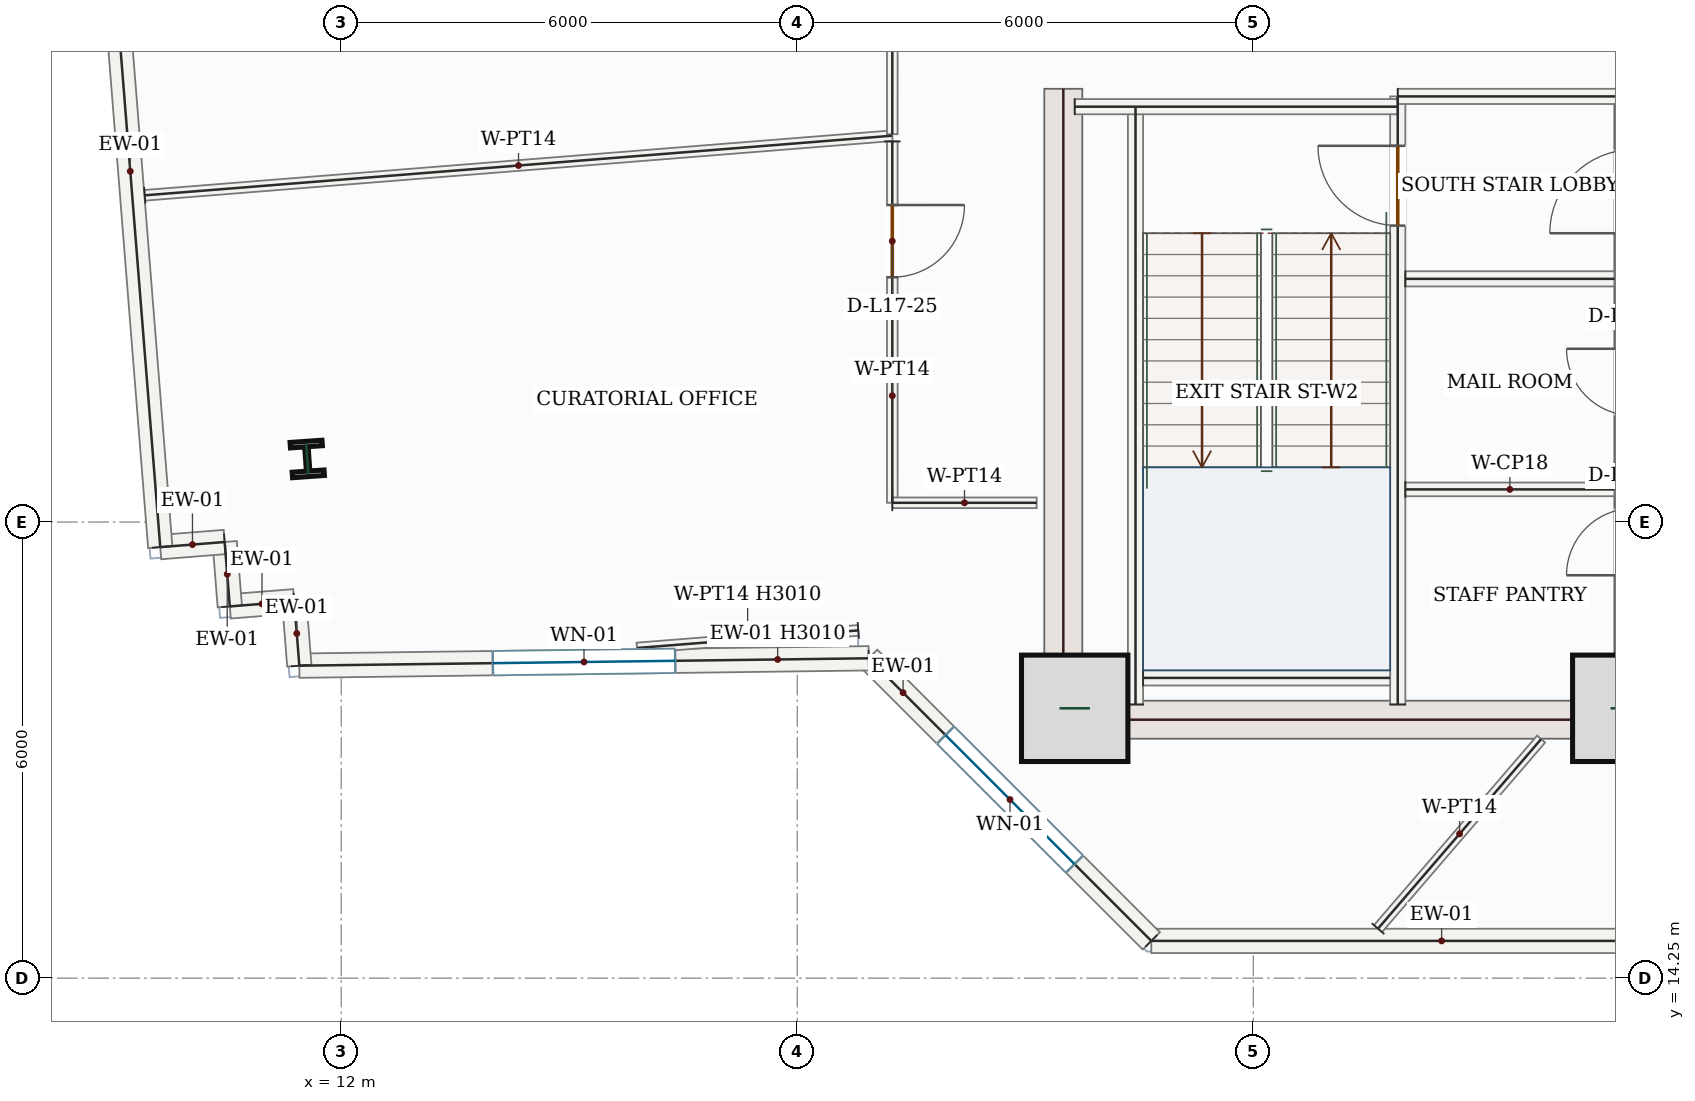
"""IFC4 building model, lengths in metres.
Left out: names, types, materials, properties, quantities, classifications, styles, units other than length and angle.
Written with IfcOpenShell. Run it as: python <this file> out.ifc"""

import sys

from ifc_helpers import new_model, si_unit, direction, frame, frame_2d, origin, origin_2d, place, context, subcontext, project, spatial, rectangle, i_section, extrude, source, transform, mapped, element, fill, save


model = new_model("IFC4")
c1 = context("Model", 3, precision=1e-05, world=origin(), true_north=direction((0.0, 1.0)))
c2 = subcontext(c1, "Body", "Model", "MODEL_VIEW")
j1 = project(units=[si_unit("LENGTHUNIT", "METRE"), si_unit("PLANEANGLEUNIT", "RADIAN")], contexts=[c1])
p1 = place(None, origin())
s1 = spatial("IfcSite", under=j1, at=p1, CompositionType="ELEMENT")
p2 = place(p1, origin())
s2 = spatial("IfcBuilding", under=s1, at=p2, CompositionType="ELEMENT")
p3 = place(p2, frame((0.0, 0.0, 79.5)))
s3 = spatial("IfcBuildingStorey", under=s2, at=p3, CompositionType="ELEMENT", Elevation=79.5)
m1 = source(origin(), c2, "Body", "SweptSolid", [
    extrude(rectangle(XDim=8.55, YDim=0.5, at=frame_2d((4.275, 0.0))), origin(), (0.0, 0.0, 1.0), 3.95),
])
p4 = place(p3, frame((21.5, 17.4, 0.0), z_axis=(0.0, 0.0, 1.0), x_axis=(0.0, 1.0, 0.0)))
e1 = element("IfcWall", 1, at=p4, inside=s3, PredefinedType="SHEAR", context=c2, shape_type="MappedRepresentation", body=[
    mapped(m1, transform((0.0, 0.0, 0.0), x_axis=(1.0, 0.0, 0.0), y_axis=(0.0, 1.0, 0.0), z_axis=(0.0, 0.0, 1.0), scale=1.0)),
])
p5 = place(p3, frame((29.0, 17.4, 0.0), z_axis=(0.0, 0.0, 1.0), x_axis=(0.0, 1.0, 0.0)))
e2 = element("IfcWall", 2, at=p5, inside=s3, PredefinedType="SHEAR", context=c2, shape_type="SweptSolid", body=[
    extrude(rectangle(XDim=8.55, YDim=0.5, at=frame_2d((4.275, 0.0))), origin(), (0.0, 0.0, 1.0), 3.95),
])
p6 = place(p5, frame((6.65, 0.0, 0.0)))
e3 = element("IfcOpeningElement", 3, at=p6, cuts=e2, PredefinedType="OPENING", context=c2, shape_type="SweptSolid", body=[
    extrude(rectangle(XDim=1.1, YDim=2.2, at=frame_2d((0.55, 1.1))), frame((0.0, 0.26, 0.0), z_axis=(0.0, -1.0, 0.0), x_axis=(1.0, 0.0, 0.0)), (0.0, 0.0, 1.0), 0.52),
])
p7 = place(p5, frame((2.15, 0.0, 0.0)))
e4 = element("IfcOpeningElement", 4, at=p7, cuts=e2, PredefinedType="OPENING", context=c2, shape_type="SweptSolid", body=[
    extrude(rectangle(XDim=0.88, YDim=2.1, at=frame_2d((0.44, 1.05))), frame((0.0, 0.26, 0.0), z_axis=(0.0, -1.0, 0.0), x_axis=(1.0, 0.0, 0.0)), (0.0, 0.0, 1.0), 0.52),
])
p8 = place(p5, frame((4.25, 0.0, 0.0)))
e5 = element("IfcOpeningElement", 5, at=p8, cuts=e2, PredefinedType="OPENING", context=c2, shape_type="SweptSolid", body=[
    extrude(rectangle(XDim=0.88, YDim=2.1, at=frame_2d((0.44, 1.05))), frame((0.0, 0.26, 0.0), z_axis=(0.0, -1.0, 0.0), x_axis=(1.0, 0.0, 0.0)), (0.0, 0.0, 1.0), 0.52),
])
m2 = source(origin(), c2, "Body", "SweptSolid", [
    extrude(rectangle(XDim=7.0, YDim=0.5, at=frame_2d((3.5, 0.0))), origin(), (0.0, 0.0, 1.0), 3.95),
])
p9 = place(p3, frame((21.75, 17.65, 0.0), z_axis=(0.0, 0.0, 1.0), x_axis=(1.0, 0.0, 0.0)))
e6 = element("IfcWall", 6, at=p9, inside=s3, PredefinedType="SHEAR", context=c2, shape_type="MappedRepresentation", body=[
    mapped(m2, transform((0.0, 0.0, 0.0), x_axis=(1.0, 0.0, 0.0), y_axis=(0.0, 1.0, 0.0), z_axis=(0.0, 0.0, 1.0), scale=1.0)),
])
m3 = source(origin(), c2, "Body", "SweptSolid", [
    extrude(rectangle(XDim=1.4, YDim=1.4, at=origin_2d()), origin(), (0.0, 0.0, 1.0), 4.2),
])
for number, where, z_axis, x_axis in (
    (7, (21.65, 17.8, 0.0), (0.0, 0.0, 1.0), (1.0, 0.0, 0.0)),
    (8, (28.9, 17.8, 0.0), (0.0, 0.0, 1.0), (1.0, 0.0, 0.0)),
):
    element("IfcColumn", number, at=place(p3, frame(where, z_axis=z_axis, x_axis=x_axis)), inside=s3, PredefinedType="COLUMN", context=c2, shape_type="MappedRepresentation", body=[
        mapped(m3, transform((0.0, 0.0, 0.0), x_axis=(1.0, 0.0, 0.0), y_axis=(0.0, 1.0, 0.0), z_axis=(0.0, 0.0, 1.0), scale=1.0)),
    ])
m4 = source(origin(), c2, "Body", "SweptSolid", [
    extrude(i_section(OverallWidth=0.421, OverallDepth=0.465, WebThickness=0.045, FlangeThickness=0.073, FilletRadius=0.018, at=origin_2d()), origin(), (0.0, 0.0, 1.0), 4.2),
])
p10 = place(p3, frame((11.553, 21.08, 0.0), z_axis=(0.0, 0.0, 1.0), x_axis=(0.99756405026, 0.069756473744, 0.0)))
e9 = element("IfcColumn", 9, at=p10, inside=s3, PredefinedType="COLUMN", context=c2, shape_type="MappedRepresentation", body=[
    mapped(m4, transform((0.0, 0.0, 0.0), x_axis=(1.0, 0.0, 0.0), y_axis=(0.0, 1.0, 0.0), z_axis=(0.0, 0.0, 1.0), scale=1.0)),
])
m5 = source(origin(), c2, "Body", "SweptSolid", [
    extrude(rectangle(XDim=7.639, YDim=0.32, at=frame_2d((3.819, 0.0))), origin(), (0.0, 0.0, 1.0), 3.95),
])
p11 = place(p3, frame((30.297, 14.74, 0.0), z_axis=(0.0, 0.0, 1.0), x_axis=(-1.0, 0.0, 0.0)))
e10 = element("IfcWall", 10, at=p11, inside=s3, PredefinedType="SOLIDWALL", context=c2, shape_type="MappedRepresentation", body=[
    mapped(m5, transform((0.0, 0.0, 0.0), x_axis=(1.0, 0.0, 0.0), y_axis=(0.0, 1.0, 0.0), z_axis=(0.0, 0.0, 1.0), scale=1.0)),
])
p12 = place(p3, frame((22.658, 14.74, 0.0), z_axis=(0.0, 0.0, 1.0), x_axis=(-0.707106781187, 0.707106781187, 0.0)))
e11 = element("IfcWall", 11, at=p12, inside=s3, PredefinedType="SOLIDWALL", context=c2, shape_type="SweptSolid", body=[
    extrude(rectangle(XDim=5.258, YDim=0.32, at=frame_2d((2.629, 0.0))), origin(), (0.0, 0.0, 1.0), 3.95),
])
p13 = place(p12, frame((1.429, 0.0, 0.85)))
e12 = element("IfcOpeningElement", 12, at=p13, cuts=e11, PredefinedType="OPENING", context=c2, shape_type="SweptSolid", body=[
    extrude(rectangle(XDim=2.4, YDim=1.8, at=frame_2d((1.2, 0.9))), frame((0.0, 0.17, 0.0), z_axis=(0.0, -1.0, 0.0), x_axis=(1.0, 0.0, 0.0)), (0.0, 0.0, 1.0), 0.34),
])
p14 = place(p3, frame((18.94, 18.458, 0.0), z_axis=(0.0, 0.0, 1.0), x_axis=(-0.999915877143, -0.012970683759, 0.0)))
e13 = element("IfcWall", 13, at=p14, inside=s3, PredefinedType="SOLIDWALL", context=c2, shape_type="SweptSolid", body=[
    extrude(rectangle(XDim=7.491, YDim=0.32, at=frame_2d((3.746, 0.0))), origin(), (0.0, 0.0, 1.0), 3.01),
])
p15 = place(p14, frame((2.546, 0.0, 0.85)))
e14 = element("IfcOpeningElement", 14, at=p15, cuts=e13, PredefinedType="OPENING", context=c2, shape_type="SweptSolid", body=[
    extrude(rectangle(XDim=2.4, YDim=1.8, at=frame_2d((1.2, 0.9))), frame((0.0, 0.17, 0.0), z_axis=(0.0, -1.0, 0.0), x_axis=(1.0, 0.0, 0.0)), (0.0, 0.0, 1.0), 0.34),
])
m6 = source(origin(), c2, "Body", "SweptSolid", [
    extrude(rectangle(XDim=0.85, YDim=0.32, at=frame_2d((0.425, 0.0))), origin(), (0.0, 0.0, 1.0), 3.95),
])
p16 = place(p3, frame((11.449, 18.361, 0.0), z_axis=(0.0, 0.0, 1.0), x_axis=(-0.079573954853, 0.996828965123, 0.0)))
e15 = element("IfcWall", 15, at=p16, inside=s3, PredefinedType="SOLIDWALL", context=c2, shape_type="MappedRepresentation", body=[
    mapped(m6, transform((0.0, 0.0, 0.0), x_axis=(1.0, 0.0, 0.0), y_axis=(0.0, 1.0, 0.0), z_axis=(0.0, 0.0, 1.0), scale=1.0)),
])
m7 = source(origin(), c2, "Body", "SweptSolid", [
    extrude(rectangle(XDim=0.85, YDim=0.32, at=frame_2d((0.425, 0.0))), origin(), (0.0, 0.0, 1.0), 3.95),
])
for number, where, z_axis, x_axis in (
    (16, (11.382, 19.208, 0.0), (0.0, 0.0, 1.0), (-0.997, -0.08, 0.0)),
    (17, (10.534, 19.14, 0.0), (0.0, 0.0, 1.0), (-0.08, 0.997, 0.0)),
):
    element("IfcWall", number, at=place(p3, frame(where, z_axis=z_axis, x_axis=x_axis)), inside=s3, PredefinedType="SOLIDWALL", context=c2, shape_type="MappedRepresentation", body=[
        mapped(m7, transform((0.0, 0.0, 0.0), x_axis=(1.0, 0.0, 0.0), y_axis=(0.0, 1.0, 0.0), z_axis=(0.0, 0.0, 1.0), scale=1.0)),
    ])
p17 = place(p3, frame((10.467, 19.988, 0.0), z_axis=(0.0, 0.0, 1.0), x_axis=(-0.996851711541, -0.079288493483, 0.0)))
e18 = element("IfcWall", 18, at=p17, inside=s3, PredefinedType="SOLIDWALL", context=c2, shape_type="MappedRepresentation", body=[
    mapped(m6, transform((0.0, 0.0, 0.0), x_axis=(1.0, 0.0, 0.0), y_axis=(0.0, 1.0, 0.0), z_axis=(0.0, 0.0, 1.0), scale=1.0)),
])
m8 = source(origin(), c2, "Body", "SweptSolid", [
    extrude(rectangle(XDim=9.92, YDim=0.32, at=frame_2d((4.96, 0.0))), origin(), (0.0, 0.0, 1.0), 3.95),
])
p18 = place(p3, frame((9.619, 19.92, 0.0), z_axis=(0.0, 0.0, 1.0), x_axis=(-0.07949480177, 0.996835280521, 0.0)))
e19 = element("IfcWall", 19, at=p18, inside=s3, PredefinedType="SOLIDWALL", context=c2, shape_type="MappedRepresentation", body=[
    mapped(m8, transform((0.0, 0.0, 0.0), x_axis=(1.0, 0.0, 0.0), y_axis=(0.0, 1.0, 0.0), z_axis=(0.0, 0.0, 1.0), scale=1.0)),
])
m9 = source(origin(), c2, "Body", "SweptSolid", [
    extrude(rectangle(XDim=7.87, YDim=0.2, at=frame_2d((3.935, 0.0))), origin(), (0.0, 0.0, 1.0), 3.95),
])
p19 = place(p3, frame((22.45, 17.85, 0.0), z_axis=(0.0, 0.0, 1.0), x_axis=(0.0, 1.0, 0.0)))
e20 = element("IfcWall", 20, at=p19, inside=s3, PredefinedType="SOLIDWALL", context=c2, shape_type="MappedRepresentation", body=[
    mapped(m9, transform((0.0, 0.0, 0.0), x_axis=(1.0, 0.0, 0.0), y_axis=(0.0, 1.0, 0.0), z_axis=(0.0, 0.0, 1.0), scale=1.0)),
])
p20 = place(p3, frame((25.9, 17.85, 0.0), z_axis=(0.0, 0.0, 1.0), x_axis=(0.0, 1.0, 0.0)))
e21 = element("IfcWall", 21, at=p20, inside=s3, PredefinedType="SOLIDWALL", context=c2, shape_type="SweptSolid", body=[
    extrude(rectangle(XDim=8.0, YDim=0.2, at=frame_2d((4.0, 0.0))), origin(), (0.0, 0.0, 1.0), 3.95),
])
p21 = place(p20, frame((6.3, 0.0, 0.0)))
e22 = element("IfcOpeningElement", 22, at=p21, cuts=e21, PredefinedType="OPENING", context=c2, shape_type="SweptSolid", body=[
    extrude(rectangle(XDim=1.05, YDim=2.15, at=frame_2d((0.525, 1.075))), frame((0.0, 0.11, 0.0), z_axis=(0.0, -1.0, 0.0), x_axis=(1.0, 0.0, 0.0)), (0.0, 0.0, 1.0), 0.22),
])
m10 = source(origin(), c2, "Body", "SweptSolid", [
    extrude(rectangle(XDim=4.25, YDim=0.2, at=frame_2d((2.125, 0.0))), origin(), (0.0, 0.0, 1.0), 3.95),
])
p22 = place(p3, frame((21.65, 25.715, 0.0), z_axis=(0.0, 0.0, 1.0), x_axis=(1.0, 0.0, 0.0)))
e23 = element("IfcWall", 23, at=p22, inside=s3, PredefinedType="SOLIDWALL", context=c2, shape_type="MappedRepresentation", body=[
    mapped(m10, transform((0.0, 0.0, 0.0), x_axis=(1.0, 0.0, 0.0), y_axis=(0.0, 1.0, 0.0), z_axis=(0.0, 0.0, 1.0), scale=1.0)),
])
m11 = source(origin(), c2, "Body", "SweptSolid", [
    extrude(rectangle(XDim=3.0, YDim=0.2, at=frame_2d((1.5, 0.0))), origin(), (0.0, 0.0, 1.0), 3.95),
])
p23 = place(p3, frame((25.9, 25.85, 0.0), z_axis=(0.0, 0.0, 1.0), x_axis=(1.0, 0.0, 0.0)))
e24 = element("IfcWall", 24, at=p23, inside=s3, PredefinedType="SOLIDWALL", context=c2, shape_type="MappedRepresentation", body=[
    mapped(m11, transform((0.0, 0.0, 0.0), x_axis=(1.0, 0.0, 0.0), y_axis=(0.0, 1.0, 0.0), z_axis=(0.0, 0.0, 1.0), scale=1.0)),
])
m12 = source(origin(), c2, "Body", "SweptSolid", [
    extrude(rectangle(XDim=3.25, YDim=0.2, at=frame_2d((1.625, 0.0))), origin(), (0.0, 0.0, 1.0), 3.95),
])
p24 = place(p3, frame((22.55, 18.2, 0.0), z_axis=(0.0, 0.0, 1.0), x_axis=(1.0, 0.0, 0.0)))
e25 = element("IfcWall", 25, at=p24, inside=s3, PredefinedType="SOLIDWALL", context=c2, shape_type="MappedRepresentation", body=[
    mapped(m12, transform((0.0, 0.0, 0.0), x_axis=(1.0, 0.0, 0.0), y_axis=(0.0, 1.0, 0.0), z_axis=(0.0, 0.0, 1.0), scale=1.0)),
])
m13 = source(origin(), c2, "Body", "SweptSolid", [
    extrude(rectangle(XDim=2.75, YDim=0.2, at=frame_2d((1.375, 0.0))), origin(), (0.0, 0.0, 1.0), 3.95),
])
p25 = place(p3, frame((26.0, 23.45, 0.0), z_axis=(0.0, 0.0, 1.0), x_axis=(1.0, 0.0, 0.0)))
e26 = element("IfcWall", 26, at=p25, inside=s3, PredefinedType="SOLIDWALL", context=c2, shape_type="MappedRepresentation", body=[
    mapped(m13, transform((0.0, 0.0, 0.0), x_axis=(1.0, 0.0, 0.0), y_axis=(0.0, 1.0, 0.0), z_axis=(0.0, 0.0, 1.0), scale=1.0)),
])
m14 = source(origin(), c2, "Body", "SweptSolid", [
    extrude(rectangle(XDim=2.75, YDim=0.18, at=frame_2d((1.375, 0.0))), origin(), (0.0, 0.0, 1.0), 3.95),
])
p26 = place(p3, frame((26.0, 20.68, 0.0), z_axis=(0.0, 0.0, 1.0), x_axis=(1.0, 0.0, 0.0)))
e27 = element("IfcWall", 27, at=p26, inside=s3, PredefinedType="PARTITIONING", context=c2, shape_type="MappedRepresentation", body=[
    mapped(m14, transform((0.0, 0.0, 0.0), x_axis=(1.0, 0.0, 0.0), y_axis=(0.0, 1.0, 0.0), z_axis=(0.0, 0.0, 1.0), scale=1.0)),
])
m15 = source(origin(), c2, "Body", "SweptSolid", [
    extrude(rectangle(XDim=3.29, YDim=0.14, at=frame_2d((1.645, 0.0))), origin(), (0.0, 0.0, 1.0), 3.95),
])
p27 = place(p3, frame((25.64, 14.901, 0.0), z_axis=(0.0, 0.0, 1.0), x_axis=(0.652214149627, 0.758034763732, 0.0)))
e28 = element("IfcWall", 28, at=p27, inside=s3, PredefinedType="PARTITIONING", context=c2, shape_type="MappedRepresentation", body=[
    mapped(m15, transform((0.0, 0.0, 0.0), x_axis=(1.0, 0.0, 0.0), y_axis=(0.0, 1.0, 0.0), z_axis=(0.0, 0.0, 1.0), scale=1.0)),
])
m16 = source(origin(), c2, "Body", "SweptSolid", [
    extrude(rectangle(XDim=2.921, YDim=0.14, at=frame_2d((1.46, 0.0))), origin(), (0.0, 0.0, 1.0), 3.01),
])
p28 = place(p3, frame((18.803, 18.825, 0.0), z_axis=(0.0, 0.0, 1.0), x_axis=(-0.996855023767, -0.079246839625, 0.0)))
e29 = element("IfcWall", 29, at=p28, inside=s3, PredefinedType="PARTITIONING", context=c2, shape_type="MappedRepresentation", body=[
    mapped(m16, transform((0.0, 0.0, 0.0), x_axis=(1.0, 0.0, 0.0), y_axis=(0.0, 1.0, 0.0), z_axis=(0.0, 0.0, 1.0), scale=1.0)),
])
m17 = source(origin(), c2, "Body", "SweptSolid", [
    extrude(rectangle(XDim=9.865, YDim=0.14, at=frame_2d((4.933, 0.0))), origin(), (0.0, 0.0, 1.0), 3.95),
])
p29 = place(p3, frame((9.416, 24.549, 0.0), z_axis=(0.0, 0.0, 1.0), x_axis=(0.996833900052, 0.079512110446, 0.0)))
e30 = element("IfcWall", 30, at=p29, inside=s3, PredefinedType="PARTITIONING", context=c2, shape_type="MappedRepresentation", body=[
    mapped(m17, transform((0.0, 0.0, 0.0), x_axis=(1.0, 0.0, 0.0), y_axis=(0.0, 1.0, 0.0), z_axis=(0.0, 0.0, 1.0), scale=1.0)),
])
p30 = place(p3, frame((19.25, 25.258, 0.0), z_axis=(0.0, 0.0, 1.0), x_axis=(0.000102701037, -0.999999994726, 0.0)))
e31 = element("IfcWall", 31, at=p30, inside=s3, PredefinedType="PARTITIONING", context=c2, shape_type="SweptSolid", body=[
    extrude(rectangle(XDim=4.754, YDim=0.14, at=frame_2d((2.377, 0.0))), origin(), (0.0, 0.0, 1.0), 3.95),
])
p31 = place(p30, frame((0.837, 0.0, 0.0)))
e32 = element("IfcOpeningElement", 32, at=p31, cuts=e31, PredefinedType="OPENING", context=c2, shape_type="SweptSolid", body=[
    extrude(rectangle(XDim=0.95, YDim=2.15, at=frame_2d((0.475, 1.075))), frame((0.0, 0.08, 0.0), z_axis=(0.0, -1.0, 0.0), x_axis=(1.0, 0.0, 0.0)), (0.0, 0.0, 1.0), 0.16),
])
m18 = source(origin(), c2, "Body", "SweptSolid", [
    extrude(rectangle(XDim=1.899, YDim=0.14, at=frame_2d((0.949, 0.0))), origin(), (0.0, 0.0, 1.0), 3.95),
])
p32 = place(p3, frame((19.25, 20.503, 0.0), z_axis=(0.0, 0.0, 1.0), x_axis=(0.999999991735, 0.000128567754, 0.0)))
e33 = element("IfcWall", 33, at=p32, inside=s3, PredefinedType="PARTITIONING", context=c2, shape_type="MappedRepresentation", body=[
    mapped(m18, transform((0.0, 0.0, 0.0), x_axis=(1.0, 0.0, 0.0), y_axis=(0.0, 1.0, 0.0), z_axis=(0.0, 0.0, 1.0), scale=1.0)),
])
p33 = place(p3, frame((19.253, 33.497, 0.0), z_axis=(0.0, 0.0, 1.0), x_axis=(-0.000329746078, -0.999999945634, 0.0)))
e34 = element("IfcWall", 34, at=p33, inside=s3, PredefinedType="PARTITIONING", context=c2, shape_type="SweptSolid", body=[
    extrude(rectangle(XDim=8.144, YDim=0.14, at=frame_2d((4.072, 0.0))), origin(), (0.0, 0.0, 1.0), 3.95),
])
p34 = place(p33, frame((5.611, 0.0, 0.0)))
e35 = element("IfcOpeningElement", 35, at=p34, cuts=e34, PredefinedType="OPENING", context=c2, shape_type="SweptSolid", body=[
    extrude(rectangle(XDim=0.95, YDim=2.15, at=frame_2d((0.475, 1.075))), frame((0.0, 0.08, 0.0), z_axis=(0.0, -1.0, 0.0), x_axis=(1.0, 0.0, 0.0)), (0.0, 0.0, 1.0), 0.16),
])
m19 = source(origin(), c2, "Body", "SweptSolid", [
    extrude(rectangle(XDim=2.4, YDim=1.8, at=frame_2d((1.2, 0.9))), frame((0.0, 0.03, 0.0), z_axis=(0.0, -1.0, 0.0), x_axis=(1.0, 0.0, 0.0)), (0.0, 0.0, 1.0), 0.06),
])
p35 = place(p13, origin())
e36 = element("IfcWindow", 36, at=p35, inside=s3, PartitioningType="DOUBLE_PANEL_VERTICAL", PredefinedType="WINDOW", context=c2, shape_type="MappedRepresentation", body=[
    mapped(m19, transform((0.0, 0.0, 0.0), x_axis=(1.0, 0.0, 0.0), y_axis=(0.0, 1.0, 0.0), z_axis=(0.0, 0.0, 1.0), scale=1.0)),
])
fill(e12, e36)
p36 = place(p15, origin())
e37 = element("IfcWindow", 37, at=p36, inside=s3, PartitioningType="DOUBLE_PANEL_VERTICAL", PredefinedType="WINDOW", context=c2, shape_type="MappedRepresentation", body=[
    mapped(m19, transform((0.0, 0.0, 0.0), x_axis=(1.0, 0.0, 0.0), y_axis=(0.0, 1.0, 0.0), z_axis=(0.0, 0.0, 1.0), scale=1.0)),
])
fill(e14, e37)
m20 = source(origin(), c2, "Body", "SweptSolid", [
    extrude(rectangle(XDim=1.05, YDim=2.15, at=frame_2d((0.525, 1.075))), frame((0.0, 0.025, 0.0), z_axis=(0.0, -1.0, 0.0), x_axis=(1.0, 0.0, 0.0)), (0.0, 0.0, 1.0), 0.05),
])
p37 = place(p21, origin())
e38 = element("IfcDoor", 38, at=p37, inside=s3, OperationType="SINGLE_SWING_RIGHT", PredefinedType="DOOR", context=c2, shape_type="MappedRepresentation", body=[
    mapped(m20, transform((0.0, 0.0, 0.0), x_axis=(1.0, 0.0, 0.0), y_axis=(0.0, 1.0, 0.0), z_axis=(0.0, 0.0, 1.0), scale=1.0)),
])
fill(e22, e38)
m21 = source(origin(), c2, "Body", "SweptSolid", [
    extrude(rectangle(XDim=0.95, YDim=2.15, at=frame_2d((0.475, 1.075))), frame((0.0, 0.025, 0.0), z_axis=(0.0, -1.0, 0.0), x_axis=(1.0, 0.0, 0.0)), (0.0, 0.0, 1.0), 0.05),
])
p38 = place(p31, origin())
e39 = element("IfcDoor", 39, at=p38, inside=s3, OperationType="SINGLE_SWING_LEFT", PredefinedType="DOOR", context=c2, shape_type="MappedRepresentation", body=[
    mapped(m21, transform((0.0, 0.0, 0.0), x_axis=(1.0, 0.0, 0.0), y_axis=(0.0, 1.0, 0.0), z_axis=(0.0, 0.0, 1.0), scale=1.0)),
])
fill(e32, e39)
save(model, sys.argv[1])
